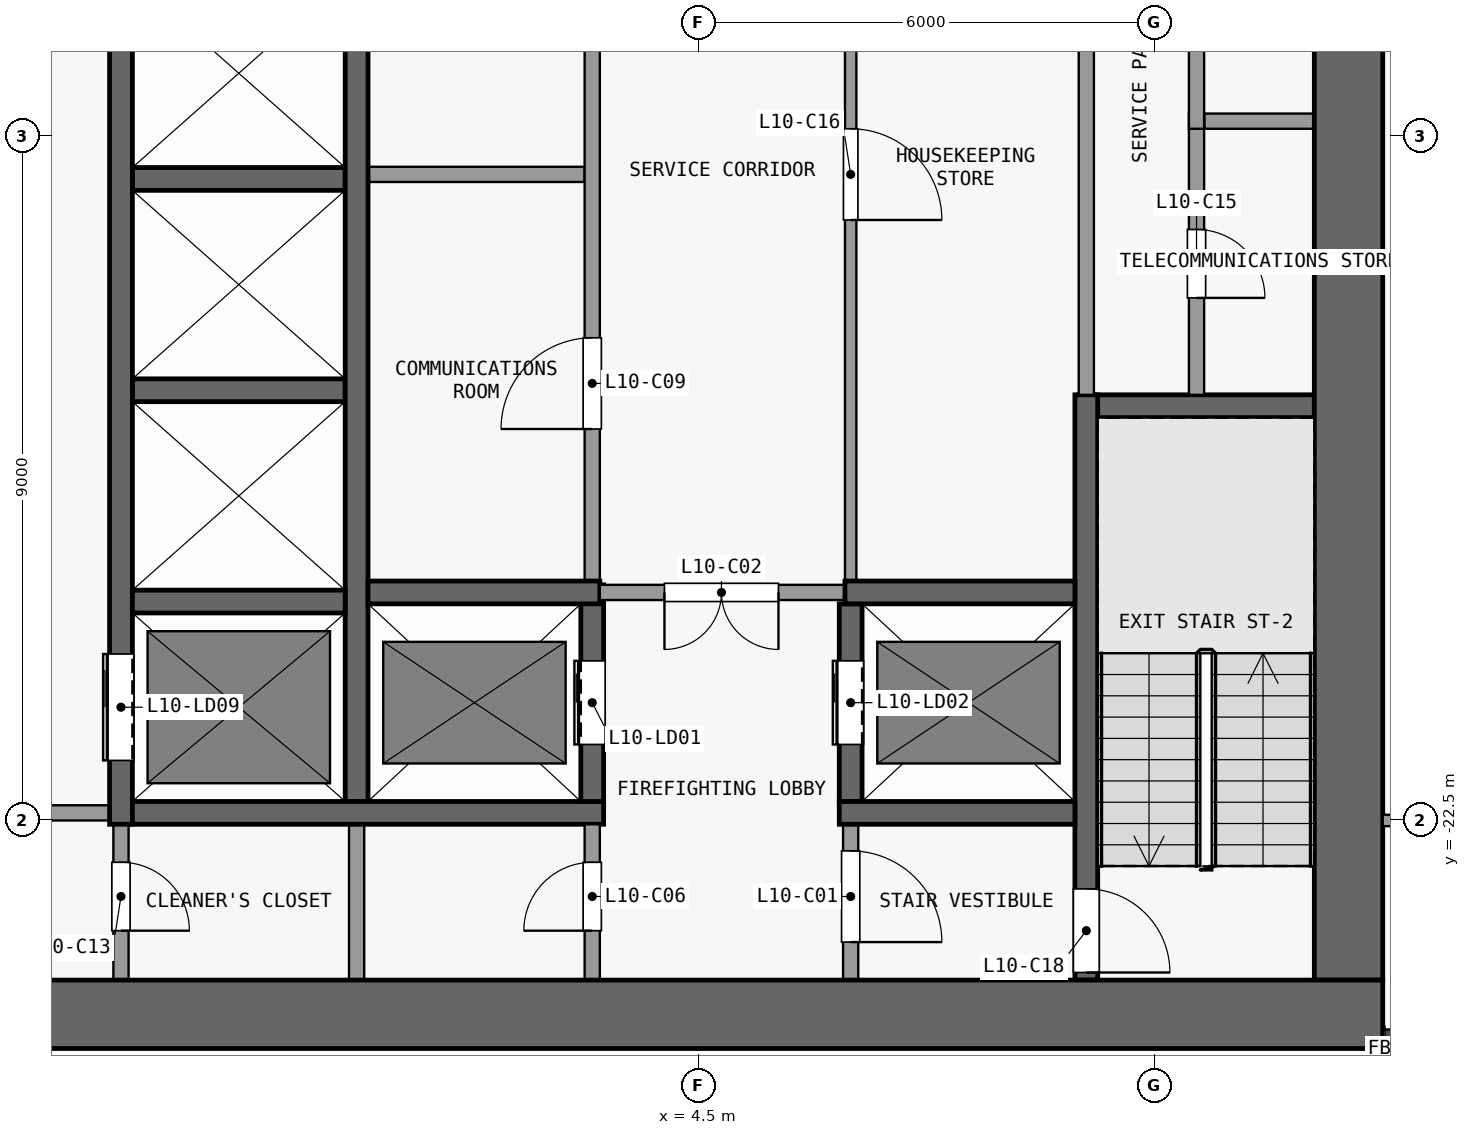
"""IFC4 building model, lengths in metres.
Left out: names, types, materials, properties, quantities, classifications, styles, units other than length and angle.
Written with IfcOpenShell. Run it as: python <this file> out.ifc"""

import sys

from ifc_helpers import new_model, si_unit, direction, frame, frame_2d, origin, place, context, subcontext, project, spatial, rectangle, extrude, element, fill, save


model = new_model("IFC4")
c1 = context("Model", 3, precision=1e-05, world=origin(), true_north=direction((0.0, 1.0)))
c2 = subcontext(c1, "Body", "Model", "MODEL_VIEW")
j1 = project(units=[si_unit("LENGTHUNIT", "METRE"), si_unit("PLANEANGLEUNIT", "RADIAN")], contexts=[c1])
p1 = place(None, origin())
s1 = spatial("IfcSite", under=j1, at=p1, CompositionType="ELEMENT")
p2 = place(p1, origin())
s2 = spatial("IfcBuilding", under=s1, at=p2, CompositionType="ELEMENT")
p3 = place(p2, frame((0.0, 0.0, 46.9)))
s3 = spatial("IfcBuildingStorey", under=s2, at=p3, CompositionType="ELEMENT", Elevation=46.9)
p4 = place(p3, frame((-13.5, -25.05, 0.0), z_axis=(0.0, 0.0, 1.0), x_axis=(1.0, 0.0, 0.0)))
e1 = element("IfcWall", 1, at=p4, inside=s3, PredefinedType="SHEAR", context=c2, shape_type="SweptSolid", body=[
    extrude(rectangle(XDim=27.0, YDim=0.9, at=frame_2d((13.5, 0.0))), origin(), (0.0, 0.0, 1.0), 3.3),
])
p5 = place(p3, frame((13.05, -24.6, 0.0), z_axis=(0.0, 0.0, 1.0), x_axis=(0.0, 1.0, 0.0)))
e2 = element("IfcWall", 2, at=p5, inside=s3, PredefinedType="SHEAR", context=c2, shape_type="SweptSolid", body=[
    extrude(rectangle(XDim=16.1, YDim=0.9, at=frame_2d((8.05, 0.0))), origin(), (0.0, 0.0, 1.0), 3.3),
])
p6 = place(p3, frame((-3.25, -22.4, 0.0), z_axis=(0.0, 0.0, 1.0), x_axis=(-1.0, 0.0, 0.0)))
e3 = element("IfcWall", 3, at=p6, inside=s3, PredefinedType="PARTITIONING", context=c2, shape_type="SweptSolid", body=[
    extrude(rectangle(XDim=3.1, YDim=0.2, at=frame_2d((1.55, 0.0))), origin(), (0.0, 0.0, 1.0), 3.3),
])
p7 = place(p6, frame((0.8, 0.0, 0.0)))
e4 = element("IfcOpeningElement", 4, at=p7, cuts=e3, PredefinedType="OPENING", context=c2, shape_type="SweptSolid", body=[
    extrude(rectangle(XDim=1.5, YDim=2.1, at=frame_2d((0.75, 1.05))), frame((0.0, 0.11, 0.0), z_axis=(0.0, -1.0, 0.0), x_axis=(1.0, 0.0, 0.0)), (0.0, 0.0, 1.0), 0.22),
])
p8 = place(p3, frame((-2.95, -22.4, 0.0), z_axis=(0.0, 0.0, 1.0), x_axis=(1.0, 0.0, 0.0)))
e5 = element("IfcWall", 5, at=p8, inside=s3, PredefinedType="SHEAR", context=c2, shape_type="SweptSolid", body=[
    extrude(rectangle(XDim=6.2, YDim=0.3, at=frame_2d((3.1, 0.0))), origin(), (0.0, 0.0, 1.0), 3.3),
])
p9 = place(p3, frame((6.35, -22.4, 0.0), z_axis=(0.0, 0.0, 1.0), x_axis=(1.0, 0.0, 0.0)))
e6 = element("IfcWall", 6, at=p9, inside=s3, PredefinedType="SHEAR", context=c2, shape_type="SweptSolid", body=[
    extrude(rectangle(XDim=3.1, YDim=0.3, at=frame_2d((1.55, 0.0))), origin(), (0.0, 0.0, 1.0), 3.3),
])
p10 = place(p3, frame((-2.95, -19.62, 0.0), z_axis=(0.0, 0.0, 1.0), x_axis=(1.0, 0.0, 0.0)))
e7 = element("IfcWall", 7, at=p10, inside=s3, PredefinedType="SHEAR", context=c2, shape_type="SweptSolid", body=[
    extrude(rectangle(XDim=2.8, YDim=0.3, at=frame_2d((1.4, 0.0))), origin(), (0.0, 0.0, 1.0), 3.3),
])
p11 = place(p3, frame((0.15, -19.5, 0.0), z_axis=(0.0, 0.0, 1.0), x_axis=(1.0, 0.0, 0.0)))
e8 = element("IfcWall", 8, at=p11, inside=s3, PredefinedType="SHEAR", context=c2, shape_type="SweptSolid", body=[
    extrude(rectangle(XDim=3.05, YDim=0.3, at=frame_2d((1.525, 0.0))), origin(), (0.0, 0.0, 1.0), 3.3),
])
p12 = place(p3, frame((6.575, -19.5, 0.0), z_axis=(0.0, 0.0, 1.0), x_axis=(-1.0, 0.0, 0.0)))
e9 = element("IfcWall", 9, at=p12, inside=s3, PredefinedType="PARTITIONING", context=c2, shape_type="SweptSolid", body=[
    extrude(rectangle(XDim=3.375, YDim=0.2, at=frame_2d((1.688, 0.0))), origin(), (0.0, 0.0, 1.0), 3.3),
])
p13 = place(p12, frame((1.025, 0.0, 0.0)))
e10 = element("IfcOpeningElement", 10, at=p13, cuts=e9, PredefinedType="OPENING", context=c2, shape_type="SweptSolid", body=[
    extrude(rectangle(XDim=1.5, YDim=2.1, at=frame_2d((0.75, 1.05))), frame((0.0, 0.11, 0.0), z_axis=(0.0, -1.0, 0.0), x_axis=(1.0, 0.0, 0.0)), (0.0, 0.0, 1.0), 0.22),
])
p14 = place(p3, frame((6.425, -19.5, 0.0), z_axis=(0.0, 0.0, 1.0), x_axis=(1.0, 0.0, 0.0)))
e11 = element("IfcWall", 11, at=p14, inside=s3, PredefinedType="SHEAR", context=c2, shape_type="SweptSolid", body=[
    extrude(rectangle(XDim=3.025, YDim=0.3, at=frame_2d((1.512, 0.0))), origin(), (0.0, 0.0, 1.0), 3.3),
])
p15 = place(p3, frame((9.5, -17.05, 0.0), z_axis=(0.0, 0.0, 1.0), x_axis=(1.0, 0.0, 0.0)))
e12 = element("IfcWall", 12, at=p15, inside=s3, PredefinedType="SHEAR", context=c2, shape_type="SweptSolid", body=[
    extrude(rectangle(XDim=3.1, YDim=0.3, at=frame_2d((1.55, 0.0))), origin(), (0.0, 0.0, 1.0), 3.3),
])
for number, where, z_axis, x_axis in (
    (13, (-2.95, -16.84, 0.0), (0.0, 0.0, 1.0), (1.0, 0.0, 0.0)),
    (14, (-2.95, -14.06, 0.0), (0.0, 0.0, 1.0), (1.0, 0.0, 0.0)),
):
    element("IfcWall", number, at=place(p3, frame(where, z_axis=z_axis, x_axis=x_axis)), inside=s3, PredefinedType="SHEAR", context=c2, shape_type="SweptSolid", body=[
        extrude(rectangle(XDim=2.8, YDim=0.3, at=frame_2d((1.4, 0.0))), origin(), (0.0, 0.0, 1.0), 3.3),
    ])
p16 = place(p3, frame((0.15, -14.0, 0.0), z_axis=(0.0, 0.0, 1.0), x_axis=(1.0, 0.0, 0.0)))
e15 = element("IfcWall", 15, at=p16, inside=s3, PredefinedType="PARTITIONING", context=c2, shape_type="SweptSolid", body=[
    extrude(rectangle(XDim=2.85, YDim=0.2, at=frame_2d((1.425, 0.0))), origin(), (0.0, 0.0, 1.0), 3.3),
])
p17 = place(p3, frame((11.15, -13.3, 0.0), z_axis=(0.0, 0.0, 1.0), x_axis=(1.0, 0.0, 0.0)))
e16 = element("IfcWall", 16, at=p17, inside=s3, PredefinedType="PARTITIONING", context=c2, shape_type="SweptSolid", body=[
    extrude(rectangle(XDim=1.45, YDim=0.2, at=frame_2d((0.725, 0.0))), origin(), (0.0, 0.0, 1.0), 3.3),
])
p18 = place(p3, frame((-3.1, -22.55, 0.0), z_axis=(0.0, 0.0, 1.0), x_axis=(0.0, -1.0, 0.0)))
e17 = element("IfcWall", 17, at=p18, inside=s3, PredefinedType="PARTITIONING", context=c2, shape_type="SweptSolid", body=[
    extrude(rectangle(XDim=2.05, YDim=0.2, at=frame_2d((1.025, 0.0))), origin(), (0.0, 0.0, 1.0), 3.3),
])
p19 = place(p18, frame((0.5, 0.0, 0.0)))
e18 = element("IfcOpeningElement", 18, at=p19, cuts=e17, PredefinedType="OPENING", context=c2, shape_type="SweptSolid", body=[
    extrude(rectangle(XDim=0.9, YDim=2.1, at=frame_2d((0.45, 1.05))), frame((0.0, 0.11, 0.0), z_axis=(0.0, -1.0, 0.0), x_axis=(1.0, 0.0, 0.0)), (0.0, 0.0, 1.0), 0.22),
])
p20 = place(p3, frame((-3.1, -22.55, 0.0), z_axis=(0.0, 0.0, 1.0), x_axis=(0.0, 1.0, 0.0)))
e19 = element("IfcWall", 19, at=p20, inside=s3, PredefinedType="SHEAR", context=c2, shape_type="SweptSolid", body=[
    extrude(rectangle(XDim=14.05, YDim=0.3, at=frame_2d((7.025, 0.0))), origin(), (0.0, 0.0, 1.0), 3.3),
])
p21 = place(p20, frame((12.11, 0.0, 0.0)))
e20 = element("IfcOpeningElement", 20, at=p21, cuts=e19, PredefinedType="OPENING", context=c2, shape_type="SweptSolid", body=[
    extrude(rectangle(XDim=1.1, YDim=2.1, at=frame_2d((0.55, 1.05))), frame((0.0, 0.16, 0.0), z_axis=(0.0, -1.0, 0.0), x_axis=(1.0, 0.0, 0.0)), (0.0, 0.0, 1.0), 0.32),
])
p22 = place(p20, frame((0.84, 0.0, 0.0)))
e21 = element("IfcOpeningElement", 21, at=p22, cuts=e19, PredefinedType="OPENING", context=c2, shape_type="SweptSolid", body=[
    extrude(rectangle(XDim=1.4, YDim=2.1, at=frame_2d((0.7, 1.05))), frame((0.0, 0.16, 0.0), z_axis=(0.0, -1.0, 0.0), x_axis=(1.0, 0.0, 0.0)), (0.0, 0.0, 1.0), 0.32),
])
p23 = place(p3, frame((0.0, -24.6, 0.0), z_axis=(0.0, 0.0, 1.0), x_axis=(0.0, 1.0, 0.0)))
e22 = element("IfcWall", 22, at=p23, inside=s3, PredefinedType="PARTITIONING", context=c2, shape_type="SweptSolid", body=[
    extrude(rectangle(XDim=2.05, YDim=0.2, at=frame_2d((1.025, 0.0))), origin(), (0.0, 0.0, 1.0), 3.3),
])
p24 = place(p3, frame((0.0, -22.25, 0.0), z_axis=(0.0, 0.0, 1.0), x_axis=(0.0, 1.0, 0.0)))
e23 = element("IfcWall", 23, at=p24, inside=s3, PredefinedType="SHEAR", context=c2, shape_type="SweptSolid", body=[
    extrude(rectangle(XDim=13.75, YDim=0.3, at=frame_2d((6.875, 0.0))), origin(), (0.0, 0.0, 1.0), 3.3),
])
p25 = place(p3, frame((3.1, -24.6, 0.0), z_axis=(0.0, 0.0, 1.0), x_axis=(0.0, 1.0, 0.0)))
e24 = element("IfcWall", 24, at=p25, inside=s3, PredefinedType="PARTITIONING", context=c2, shape_type="SweptSolid", body=[
    extrude(rectangle(XDim=2.05, YDim=0.2, at=frame_2d((1.025, 0.0))), origin(), (0.0, 0.0, 1.0), 3.3),
])
p26 = place(p25, frame((0.65, 0.0, 0.0)))
e25 = element("IfcOpeningElement", 25, at=p26, cuts=e24, PredefinedType="OPENING", context=c2, shape_type="SweptSolid", body=[
    extrude(rectangle(XDim=0.9, YDim=2.1, at=frame_2d((0.45, 1.05))), frame((0.0, 0.11, 0.0), z_axis=(0.0, -1.0, 0.0), x_axis=(1.0, 0.0, 0.0)), (0.0, 0.0, 1.0), 0.22),
])
p27 = place(p3, frame((3.1, -22.25, 0.0), z_axis=(0.0, 0.0, 1.0), x_axis=(0.0, 1.0, 0.0)))
e26 = element("IfcWall", 26, at=p27, inside=s3, PredefinedType="SHEAR", context=c2, shape_type="SweptSolid", body=[
    extrude(rectangle(XDim=2.85, YDim=0.3, at=frame_2d((1.425, 0.0))), origin(), (0.0, 0.0, 1.0), 3.3),
])
p28 = place(p27, frame((0.75, 0.0, 0.0)))
e27 = element("IfcOpeningElement", 27, at=p28, cuts=e26, PredefinedType="OPENING", context=c2, shape_type="SweptSolid", body=[
    extrude(rectangle(XDim=1.1, YDim=2.1, at=frame_2d((0.55, 1.05))), frame((0.0, 0.16, 0.0), z_axis=(0.0, -1.0, 0.0), x_axis=(1.0, 0.0, 0.0)), (0.0, 0.0, 1.0), 0.32),
])
p29 = place(p3, frame((3.1, -19.6, 0.0), z_axis=(0.0, 0.0, 1.0), x_axis=(0.0, 1.0, 0.0)))
e28 = element("IfcWall", 28, at=p29, inside=s3, PredefinedType="PARTITIONING", context=c2, shape_type="SweptSolid", body=[
    extrude(rectangle(XDim=11.1, YDim=0.2, at=frame_2d((5.55, 0.0))), origin(), (0.0, 0.0, 1.0), 3.3),
])
p30 = place(p29, frame((2.25, 0.0, 0.0)))
e29 = element("IfcOpeningElement", 29, at=p30, cuts=e28, PredefinedType="OPENING", context=c2, shape_type="SweptSolid", body=[
    extrude(rectangle(XDim=1.2, YDim=2.1, at=frame_2d((0.6, 1.05))), frame((0.0, 0.11, 0.0), z_axis=(0.0, -1.0, 0.0), x_axis=(1.0, 0.0, 0.0)), (0.0, 0.0, 1.0), 0.22),
])
p31 = place(p29, frame((7.75, 0.0, 0.0)))
e30 = element("IfcOpeningElement", 30, at=p31, cuts=e28, PredefinedType="OPENING", context=c2, shape_type="SweptSolid", body=[
    extrude(rectangle(XDim=1.2, YDim=2.1, at=frame_2d((0.6, 1.05))), frame((0.0, 0.11, 0.0), z_axis=(0.0, -1.0, 0.0), x_axis=(1.0, 0.0, 0.0)), (0.0, 0.0, 1.0), 0.22),
])
p32 = place(p3, frame((6.5, -22.55, 0.0), z_axis=(0.0, 0.0, 1.0), x_axis=(0.0, -1.0, 0.0)))
e31 = element("IfcWall", 31, at=p32, inside=s3, PredefinedType="PARTITIONING", context=c2, shape_type="SweptSolid", body=[
    extrude(rectangle(XDim=2.05, YDim=0.2, at=frame_2d((1.025, 0.0))), origin(), (0.0, 0.0, 1.0), 3.3),
])
p33 = place(p32, frame((0.35, 0.0, 0.0)))
e32 = element("IfcOpeningElement", 32, at=p33, cuts=e31, PredefinedType="OPENING", context=c2, shape_type="SweptSolid", body=[
    extrude(rectangle(XDim=1.2, YDim=2.1, at=frame_2d((0.6, 1.05))), frame((0.0, 0.11, 0.0), z_axis=(0.0, -1.0, 0.0), x_axis=(1.0, 0.0, 0.0)), (0.0, 0.0, 1.0), 0.22),
])
p34 = place(p3, frame((6.5, -22.25, 0.0), z_axis=(0.0, 0.0, 1.0), x_axis=(0.0, 1.0, 0.0)))
e33 = element("IfcWall", 33, at=p34, inside=s3, PredefinedType="SHEAR", context=c2, shape_type="SweptSolid", body=[
    extrude(rectangle(XDim=2.6, YDim=0.3, at=frame_2d((1.3, 0.0))), origin(), (0.0, 0.0, 1.0), 3.3),
])
p35 = place(p34, frame((0.75, 0.0, 0.0)))
e34 = element("IfcOpeningElement", 34, at=p35, cuts=e33, PredefinedType="OPENING", context=c2, shape_type="SweptSolid", body=[
    extrude(rectangle(XDim=1.1, YDim=2.1, at=frame_2d((0.55, 1.05))), frame((0.0, 0.16, 0.0), z_axis=(0.0, -1.0, 0.0), x_axis=(1.0, 0.0, 0.0)), (0.0, 0.0, 1.0), 0.32),
])
p36 = place(p3, frame((6.5, -8.5, 0.0), z_axis=(0.0, 0.0, 1.0), x_axis=(0.0, -1.0, 0.0)))
e35 = element("IfcWall", 35, at=p36, inside=s3, PredefinedType="PARTITIONING", context=c2, shape_type="SweptSolid", body=[
    extrude(rectangle(XDim=10.85, YDim=0.15, at=frame_2d((5.425, 0.0))), origin(), (0.0, 0.0, 1.0), 3.3),
])
p37 = place(p36, frame((4.9, 0.0, 0.0)))
e36 = element("IfcOpeningElement", 36, at=p37, cuts=e35, PredefinedType="OPENING", context=c2, shape_type="SweptSolid", body=[
    extrude(rectangle(XDim=1.2, YDim=2.1, at=frame_2d((0.6, 1.05))), frame((0.0, 0.085, 0.0), z_axis=(0.0, -1.0, 0.0), x_axis=(1.0, 0.0, 0.0)), (0.0, 0.0, 1.0), 0.17),
])
p38 = place(p3, frame((9.6, -16.9, 0.0), z_axis=(0.0, 0.0, 1.0), x_axis=(0.0, -1.0, 0.0)))
e37 = element("IfcWall", 37, at=p38, inside=s3, PredefinedType="SHEAR", context=c2, shape_type="SweptSolid", body=[
    extrude(rectangle(XDim=7.7, YDim=0.3, at=frame_2d((3.85, 0.0))), origin(), (0.0, 0.0, 1.0), 3.3),
])
p39 = place(p38, frame((6.5, 0.0, 0.0)))
e38 = element("IfcOpeningElement", 38, at=p39, cuts=e37, PredefinedType="OPENING", context=c2, shape_type="SweptSolid", body=[
    extrude(rectangle(XDim=1.1, YDim=2.1, at=frame_2d((0.55, 1.05))), frame((0.0, 0.16, 0.0), z_axis=(0.0, -1.0, 0.0), x_axis=(1.0, 0.0, 0.0)), (0.0, 0.0, 1.0), 0.32),
])
p40 = place(p3, frame((9.6, -16.9, 0.0), z_axis=(0.0, 0.0, 1.0), x_axis=(0.0, 1.0, 0.0)))
e39 = element("IfcWall", 39, at=p40, inside=s3, PredefinedType="PARTITIONING", context=c2, shape_type="SweptSolid", body=[
    extrude(rectangle(XDim=8.4, YDim=0.2, at=frame_2d((4.2, 0.0))), origin(), (0.0, 0.0, 1.0), 3.3),
])
p41 = place(p3, frame((11.05, -13.2, 0.0), z_axis=(0.0, 0.0, 1.0), x_axis=(0.0, -1.0, 0.0)))
e40 = element("IfcWall", 40, at=p41, inside=s3, PredefinedType="PARTITIONING", context=c2, shape_type="SweptSolid", body=[
    extrude(rectangle(XDim=3.7, YDim=0.2, at=frame_2d((1.85, 0.0))), origin(), (0.0, 0.0, 1.0), 3.3),
])
p42 = place(p41, frame((1.525, 0.0, 0.0)))
e41 = element("IfcOpeningElement", 41, at=p42, cuts=e40, PredefinedType="OPENING", context=c2, shape_type="SweptSolid", body=[
    extrude(rectangle(XDim=0.9, YDim=2.1, at=frame_2d((0.45, 1.05))), frame((0.0, 0.11, 0.0), z_axis=(0.0, -1.0, 0.0), x_axis=(1.0, 0.0, 0.0)), (0.0, 0.0, 1.0), 0.22),
])
p43 = place(p3, frame((11.05, -8.5, 0.0), z_axis=(0.0, 0.0, 1.0), x_axis=(0.0, -1.0, 0.0)))
e42 = element("IfcWall", 42, at=p43, inside=s3, PredefinedType="PARTITIONING", context=c2, shape_type="SweptSolid", body=[
    extrude(rectangle(XDim=4.9, YDim=0.2, at=frame_2d((2.45, 0.0))), origin(), (0.0, 0.0, 1.0), 3.3),
])
p44 = place(p43, frame((1.95, 0.0, 0.0)))
e43 = element("IfcOpeningElement", 43, at=p44, cuts=e42, PredefinedType="OPENING", context=c2, shape_type="SweptSolid", body=[
    extrude(rectangle(XDim=0.9, YDim=2.1, at=frame_2d((0.45, 1.05))), frame((0.0, 0.11, 0.0), z_axis=(0.0, -1.0, 0.0), x_axis=(1.0, 0.0, 0.0)), (0.0, 0.0, 1.0), 0.22),
])
p45 = place(p3, frame((13.5, -22.5, 0.0), z_axis=(0.0, 0.0, 1.0), x_axis=(1.0, 0.0, 0.0)))
e44 = element("IfcWall", 44, at=p45, inside=s3, PredefinedType="PARTITIONING", context=c2, shape_type="SweptSolid", body=[
    extrude(rectangle(XDim=2.925, YDim=0.15, at=frame_2d((1.462, 0.0))), origin(), (0.0, 0.0, 1.0), 3.3),
])
p46 = place(p45, frame((1.0, 0.0, 0.0)))
e45 = element("IfcOpeningElement", 45, at=p46, cuts=e44, PredefinedType="OPENING", context=c2, shape_type="SweptSolid", body=[
    extrude(rectangle(XDim=0.9, YDim=2.1, at=frame_2d((0.45, 1.05))), frame((0.0, 0.085, 0.0), z_axis=(0.0, -1.0, 0.0), x_axis=(1.0, 0.0, 0.0)), (0.0, 0.0, 1.0), 0.17),
])
p47 = place(p28, origin())
e46 = element("IfcDoor", 46, at=p47, inside=s3, OperationType="DOUBLE_DOOR_SLIDING", PredefinedType="DOOR", context=c2, shape_type="SweptSolid", body=[
    extrude(rectangle(XDim=1.1, YDim=2.1, at=frame_2d((0.55, 1.05))), frame((0.0, 0.025, 0.0), z_axis=(0.0, -1.0, 0.0), x_axis=(1.0, 0.0, 0.0)), (0.0, 0.0, 1.0), 0.05),
])
fill(e27, e46)
p48 = place(p35, origin())
e47 = element("IfcDoor", 47, at=p48, inside=s3, OperationType="DOUBLE_DOOR_SLIDING", PredefinedType="DOOR", context=c2, shape_type="SweptSolid", body=[
    extrude(rectangle(XDim=1.1, YDim=2.1, at=frame_2d((0.55, 1.05))), frame((0.0, 0.025, 0.0), z_axis=(0.0, -1.0, 0.0), x_axis=(1.0, 0.0, 0.0)), (0.0, 0.0, 1.0), 0.05),
])
fill(e34, e47)
p49 = place(p22, origin())
e48 = element("IfcDoor", 48, at=p49, inside=s3, OperationType="DOUBLE_DOOR_SLIDING", PredefinedType="DOOR", context=c2, shape_type="SweptSolid", body=[
    extrude(rectangle(XDim=1.4, YDim=2.1, at=frame_2d((0.7, 1.05))), frame((0.0, 0.025, 0.0), z_axis=(0.0, -1.0, 0.0), x_axis=(1.0, 0.0, 0.0)), (0.0, 0.0, 1.0), 0.05),
])
fill(e21, e48)
p50 = place(p33, origin())
e49 = element("IfcDoor", 49, at=p50, inside=s3, OperationType="SINGLE_SWING_RIGHT", PredefinedType="DOOR", context=c2, shape_type="SweptSolid", body=[
    extrude(rectangle(XDim=1.2, YDim=2.1, at=frame_2d((0.6, 1.05))), frame((0.0, 0.025, 0.0), z_axis=(0.0, -1.0, 0.0), x_axis=(1.0, 0.0, 0.0)), (0.0, 0.0, 1.0), 0.05),
])
fill(e32, e49)
p51 = place(p13, origin())
e50 = element("IfcDoor", 50, at=p51, inside=s3, OperationType="DOUBLE_DOOR_SINGLE_SWING", PredefinedType="DOOR", context=c2, shape_type="SweptSolid", body=[
    extrude(rectangle(XDim=1.5, YDim=2.1, at=frame_2d((0.75, 1.05))), frame((0.0, 0.025, 0.0), z_axis=(0.0, -1.0, 0.0), x_axis=(1.0, 0.0, 0.0)), (0.0, 0.0, 1.0), 0.05),
])
fill(e10, e50)
p52 = place(p26, origin())
e51 = element("IfcDoor", 51, at=p52, inside=s3, OperationType="SINGLE_SWING_LEFT", PredefinedType="DOOR", context=c2, shape_type="SweptSolid", body=[
    extrude(rectangle(XDim=0.9, YDim=2.1, at=frame_2d((0.45, 1.05))), frame((0.0, 0.025, 0.0), z_axis=(0.0, -1.0, 0.0), x_axis=(1.0, 0.0, 0.0)), (0.0, 0.0, 1.0), 0.05),
])
fill(e25, e51)
p53 = place(p30, origin())
e52 = element("IfcDoor", 52, at=p53, inside=s3, OperationType="SINGLE_SWING_LEFT", PredefinedType="DOOR", context=c2, shape_type="SweptSolid", body=[
    extrude(rectangle(XDim=1.2, YDim=2.1, at=frame_2d((0.6, 1.05))), frame((0.0, 0.025, 0.0), z_axis=(0.0, -1.0, 0.0), x_axis=(1.0, 0.0, 0.0)), (0.0, 0.0, 1.0), 0.05),
])
fill(e29, e52)
p54 = place(p19, origin())
e53 = element("IfcDoor", 53, at=p54, inside=s3, OperationType="SINGLE_SWING_RIGHT", PredefinedType="DOOR", context=c2, shape_type="SweptSolid", body=[
    extrude(rectangle(XDim=0.9, YDim=2.1, at=frame_2d((0.45, 1.05))), frame((0.0, 0.025, 0.0), z_axis=(0.0, -1.0, 0.0), x_axis=(1.0, 0.0, 0.0)), (0.0, 0.0, 1.0), 0.05),
])
fill(e18, e53)
p55 = place(p42, origin())
e54 = element("IfcDoor", 54, at=p55, inside=s3, OperationType="SINGLE_SWING_RIGHT", PredefinedType="DOOR", context=c2, shape_type="SweptSolid", body=[
    extrude(rectangle(XDim=0.9, YDim=2.1, at=frame_2d((0.45, 1.05))), frame((0.0, 0.025, 0.0), z_axis=(0.0, -1.0, 0.0), x_axis=(1.0, 0.0, 0.0)), (0.0, 0.0, 1.0), 0.05),
])
fill(e41, e54)
p56 = place(p37, origin())
e55 = element("IfcDoor", 55, at=p56, inside=s3, OperationType="SINGLE_SWING_RIGHT", PredefinedType="DOOR", context=c2, shape_type="SweptSolid", body=[
    extrude(rectangle(XDim=1.2, YDim=2.1, at=frame_2d((0.6, 1.05))), frame((0.0, 0.025, 0.0), z_axis=(0.0, -1.0, 0.0), x_axis=(1.0, 0.0, 0.0)), (0.0, 0.0, 1.0), 0.05),
])
fill(e36, e55)
p57 = place(p39, origin())
e56 = element("IfcDoor", 56, at=p57, inside=s3, OperationType="SINGLE_SWING_RIGHT", PredefinedType="DOOR", context=c2, shape_type="SweptSolid", body=[
    extrude(rectangle(XDim=1.1, YDim=2.1, at=frame_2d((0.55, 1.05))), frame((0.0, 0.025, 0.0), z_axis=(0.0, -1.0, 0.0), x_axis=(1.0, 0.0, 0.0)), (0.0, 0.0, 1.0), 0.05),
])
fill(e38, e56)
save(model, sys.argv[1])
